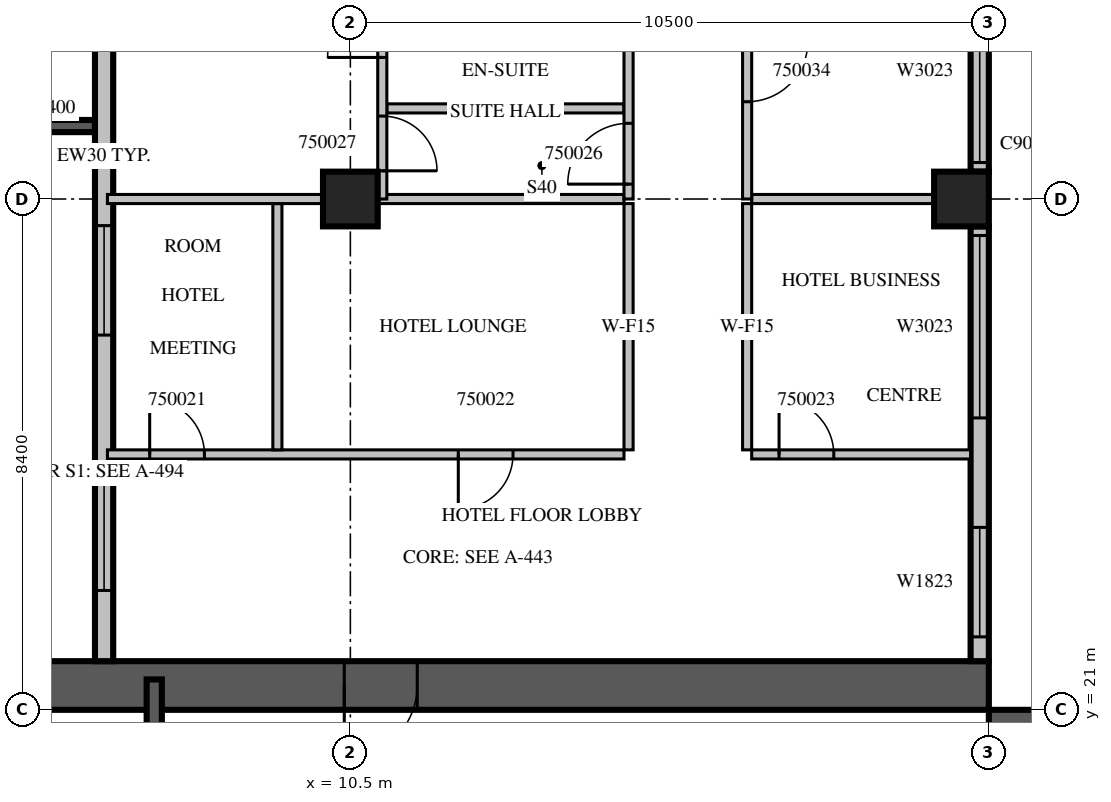
"""IFC4 building model, lengths in metres.
Left out: names, types, materials, properties, quantities, classifications, styles, units other than length and angle.
Written with IfcOpenShell. Run it as: python <this file> out.ifc"""

import sys

from ifc_helpers import new_model, si_unit, direction, frame, frame_2d, origin, origin_2d, place, context, subcontext, project, spatial, rectangle, extrude, source, transform, mapped, element, fill, save


model = new_model("IFC4")
c1 = context("Model", 3, precision=1e-05, world=origin(), true_north=direction((0.0, 1.0)))
c2 = subcontext(c1, "Body", "Model", "MODEL_VIEW")
j1 = project(units=[si_unit("LENGTHUNIT", "METRE"), si_unit("PLANEANGLEUNIT", "RADIAN")], contexts=[c1])
p1 = place(None, origin())
s1 = spatial("IfcSite", under=j1, at=p1, CompositionType="ELEMENT")
p2 = place(p1, origin())
s2 = spatial("IfcBuilding", under=s1, at=p2, CompositionType="ELEMENT")
p3 = place(p2, frame((0.0, 0.0, 223.4)))
s3 = spatial("IfcBuildingStorey", under=s2, at=p3, CompositionType="ELEMENT", Elevation=223.4)
m1 = source(origin(), c2, "Body", "SweptSolid", [
    extrude(rectangle(XDim=0.9, YDim=0.9, at=origin_2d()), origin(), (0.0, 0.0, 1.0), 3.8),
])
for number, where, z_axis, x_axis in (
    (1, (10.5, 29.4, 0.0), (0.0, 0.0, 1.0), (1.0, 0.0, 0.0)),
    (2, (20.55, 29.4, 0.0), (0.0, 0.0, 1.0), (1.0, 0.0, 0.0)),
):
    element("IfcColumn", number, at=place(p3, frame(where, z_axis=z_axis, x_axis=x_axis)), inside=s3, PredefinedType="COLUMN", context=c2, shape_type="MappedRepresentation", body=[
        mapped(m1, transform((0.0, 0.0, 0.0), scale=1.0)),
    ])
m2 = source(origin(), c2, "Body", "SweptSolid", [
    extrude(rectangle(XDim=16.8, YDim=0.8, at=frame_2d((8.4, 0.0))), origin(), (0.0, 0.0, 1.0), 3.8),
])
p4 = place(p3, frame((21.4, 4.2, 0.0), z_axis=(0.0, 0.0, 1.0), x_axis=(0.0, 1.0, 0.0)))
e3 = element("IfcWall", 3, at=p4, inside=s3, PredefinedType="SHEAR", context=c2, shape_type="MappedRepresentation", body=[
    mapped(m2, transform((0.0, 0.0, 0.0), scale=1.0)),
])
m3 = source(origin(), c2, "Body", "SweptSolid", [
    extrude(rectangle(XDim=2.2, YDim=2.1, at=frame_2d((1.1, 1.05))), frame((0.0, 0.41, 0.0), z_axis=(0.0, -1.0, 0.0), x_axis=(1.0, 0.0, 0.0)), (0.0, 0.0, 1.0), 0.82),
])
p5 = place(p4, frame((4.2, 0.0, 0.0)))
e4 = element("IfcOpeningElement", 4, at=p5, cuts=e3, PredefinedType="OPENING", context=c2, shape_type="MappedRepresentation", body=[
    mapped(m3, transform((0.0, 0.0, 0.0), scale=1.0)),
])
m4 = source(origin(), c2, "Body", "SweptSolid", [
    extrude(rectangle(XDim=1.2, YDim=2.1, at=frame_2d((0.6, 1.05))), frame((0.0, 0.41, 0.0), z_axis=(0.0, -1.0, 0.0), x_axis=(1.0, 0.0, 0.0)), (0.0, 0.0, 1.0), 0.82),
])
p6 = place(p4, frame((14.7, 0.0, 0.0)))
e5 = element("IfcOpeningElement", 5, at=p6, cuts=e3, PredefinedType="OPENING", context=c2, shape_type="MappedRepresentation", body=[
    mapped(m4, transform((0.0, 0.0, 0.0), scale=1.0)),
])
p7 = place(p3, frame((4.2, 21.4, 0.0), z_axis=(0.0, 0.0, 1.0), x_axis=(1.0, 0.0, 0.0)))
e6 = element("IfcWall", 6, at=p7, inside=s3, PredefinedType="SHEAR", context=c2, shape_type="MappedRepresentation", body=[
    mapped(m2, transform((0.0, 0.0, 0.0), scale=1.0)),
])
p8 = place(p7, frame((6.2, 0.0, 0.0)))
e7 = element("IfcOpeningElement", 7, at=p8, cuts=e6, PredefinedType="OPENING", context=c2, shape_type="MappedRepresentation", body=[
    mapped(m4, transform((0.0, 0.0, 0.0), scale=1.0)),
])
m5 = source(origin(), c2, "Body", "SweptSolid", [
    extrude(rectangle(XDim=2.1, YDim=0.2, at=frame_2d((1.05, 0.0))), origin(), (0.0, 0.0, 1.0), 3.4),
])
p9 = place(p3, frame((6.3, 30.6, 0.0), z_axis=(0.0, 0.0, 1.0), x_axis=(-1.0, 0.0, 0.0)))
e8 = element("IfcWall", 8, at=p9, inside=s3, PredefinedType="SOLIDWALL", context=c2, shape_type="MappedRepresentation", body=[
    mapped(m5, transform((0.0, 0.0, 0.0), scale=1.0)),
])
m6 = source(origin(), c2, "Body", "SweptSolid", [
    extrude(rectangle(XDim=7.15, YDim=0.3, at=frame_2d((3.575, 0.0))), origin(), (0.0, 0.0, 1.0), 3.4),
])
p10 = place(p3, frame((20.85, 21.8, 0.0), z_axis=(0.0, 0.0, 1.0), x_axis=(0.0, 1.0, 0.0)))
e9 = element("IfcWall", 9, at=p10, inside=s3, PredefinedType="STANDARD", context=c2, shape_type="MappedRepresentation", body=[
    mapped(m6, transform((0.0, 0.0, 0.0), scale=1.0)),
])
m7 = source(origin(), c2, "Body", "SweptSolid", [
    extrude(rectangle(XDim=1.8, YDim=2.3, at=frame_2d((0.9, 1.15))), frame((0.0, 0.16, 0.0), z_axis=(0.0, -1.0, 0.0), x_axis=(1.0, 0.0, 0.0)), (0.0, 0.0, 1.0), 0.32),
])
p11 = place(p10, frame((0.4, 0.0, 0.6)))
e10 = element("IfcOpeningElement", 10, at=p11, cuts=e9, PredefinedType="OPENING", context=c2, shape_type="MappedRepresentation", body=[
    mapped(m7, transform((0.0, 0.0, 0.0), scale=1.0)),
])
m8 = source(origin(), c2, "Body", "SweptSolid", [
    extrude(rectangle(XDim=3.0, YDim=2.3, at=frame_2d((1.5, 1.15))), frame((0.0, 0.16, 0.0), z_axis=(0.0, -1.0, 0.0), x_axis=(1.0, 0.0, 0.0)), (0.0, 0.0, 1.0), 0.32),
])
p12 = place(p10, frame((4.0, 0.0, 0.6)))
e11 = element("IfcOpeningElement", 11, at=p12, cuts=e9, PredefinedType="OPENING", context=c2, shape_type="MappedRepresentation", body=[
    mapped(m8, transform((0.0, 0.0, 0.0), scale=1.0)),
])
m9 = source(origin(), c2, "Body", "SweptSolid", [
    extrude(rectangle(XDim=7.5, YDim=0.3, at=frame_2d((3.75, 0.0))), origin(), (0.0, 0.0, 1.0), 3.4),
])
p13 = place(p3, frame((20.85, 29.85, 0.0), z_axis=(0.0, 0.0, 1.0), x_axis=(0.0, 1.0, 0.0)))
e12 = element("IfcWall", 12, at=p13, inside=s3, PredefinedType="STANDARD", context=c2, shape_type="MappedRepresentation", body=[
    mapped(m9, transform((0.0, 0.0, 0.0), scale=1.0)),
])
p14 = place(p13, frame((0.15, 0.0, 0.6)))
e13 = element("IfcOpeningElement", 13, at=p14, cuts=e12, PredefinedType="OPENING", context=c2, shape_type="MappedRepresentation", body=[
    mapped(m8, transform((0.0, 0.0, 0.0), scale=1.0)),
])
m10 = source(origin(), c2, "Body", "SweptSolid", [
    extrude(rectangle(XDim=1.0, YDim=2.1, at=frame_2d((0.5, 1.05))), frame((0.0, 0.16, 0.0), z_axis=(0.0, -1.0, 0.0), x_axis=(1.0, 0.0, 0.0)), (0.0, 0.0, 1.0), 0.32),
])
p15 = place(p13, frame((5.35, 0.0, 0.0)))
e14 = element("IfcOpeningElement", 14, at=p15, cuts=e12, PredefinedType="OPENING", context=c2, shape_type="MappedRepresentation", body=[
    mapped(m10, transform((0.0, 0.0, 0.0), scale=1.0)),
])
m11 = source(origin(), c2, "Body", "SweptSolid", [
    extrude(rectangle(XDim=16.6, YDim=0.3, at=frame_2d((8.3, 0.0))), origin(), (0.0, 0.0, 1.0), 3.4),
])
p16 = place(p3, frame((6.45, 38.4, 0.0), z_axis=(0.0, 0.0, 1.0), x_axis=(0.0, -1.0, 0.0)))
e15 = element("IfcWall", 15, at=p16, inside=s3, PredefinedType="STANDARD", context=c2, shape_type="MappedRepresentation", body=[
    mapped(m11, transform((0.0, 0.0, 0.0), scale=1.0)),
])
p17 = place(p16, frame((1.15, 0.0, 0.6)))
e16 = element("IfcOpeningElement", 16, at=p17, cuts=e15, PredefinedType="OPENING", context=c2, shape_type="MappedRepresentation", body=[
    mapped(m7, transform((0.0, 0.0, 0.0), scale=1.0)),
])
p18 = place(p16, frame((9.438, 0.0, 0.6)))
e17 = element("IfcOpeningElement", 17, at=p18, cuts=e15, PredefinedType="OPENING", context=c2, shape_type="MappedRepresentation", body=[
    mapped(m7, transform((0.0, 0.0, 0.0), scale=1.0)),
])
p19 = place(p16, frame((13.637, 0.0, 0.6)))
e18 = element("IfcOpeningElement", 18, at=p19, cuts=e15, PredefinedType="OPENING", context=c2, shape_type="MappedRepresentation", body=[
    mapped(m7, transform((0.0, 0.0, 0.0), scale=1.0)),
])
p20 = place(p16, frame((5.45, 0.0, 0.0)))
e19 = element("IfcOpeningElement", 19, at=p20, cuts=e15, PredefinedType="OPENING", context=c2, shape_type="MappedRepresentation", body=[
    mapped(m10, transform((0.0, 0.0, 0.0), scale=1.0)),
])
m12 = source(origin(), c2, "Body", "SweptSolid", [
    extrude(rectangle(XDim=6.6, YDim=0.25, at=frame_2d((3.3, 0.0))), origin(), (0.0, 0.0, 1.0), 3.4),
])
p21 = place(p3, frame((7.275, 14.9, 0.0), z_axis=(0.0, 0.0, 1.0), x_axis=(0.0, 1.0, 0.0)))
e20 = element("IfcWall", 20, at=p21, inside=s3, PredefinedType="SOLIDWALL", context=c2, shape_type="MappedRepresentation", body=[
    mapped(m12, transform((0.0, 0.0, 0.0), scale=1.0)),
])
m13 = source(origin(), c2, "Body", "SweptSolid", [
    extrude(rectangle(XDim=1.1, YDim=2.1, at=frame_2d((0.55, 1.05))), frame((0.0, 0.135, 0.0), z_axis=(0.0, -1.0, 0.0), x_axis=(1.0, 0.0, 0.0)), (0.0, 0.0, 1.0), 0.27),
])
p22 = place(p21, frame((0.15, 0.0, 0.0)))
e21 = element("IfcOpeningElement", 21, at=p22, cuts=e20, PredefinedType="OPENING", context=c2, shape_type="MappedRepresentation", body=[
    mapped(m13, transform((0.0, 0.0, 0.0), scale=1.0)),
])
m14 = source(origin(), c2, "Body", "SweptSolid", [
    extrude(rectangle(XDim=8.495, YDim=0.15, at=frame_2d((4.247, 0.0))), origin(), (0.0, 0.0, 1.0), 3.4),
])
p23 = place(p3, frame((6.505, 25.2, 0.0), z_axis=(0.0, 0.0, 1.0), x_axis=(1.0, 0.0, 0.0)))
e22 = element("IfcWall", 22, at=p23, inside=s3, PredefinedType="PARTITIONING", context=c2, shape_type="MappedRepresentation", body=[
    mapped(m14, transform((0.0, 0.0, 0.0), scale=1.0)),
])
m15 = source(origin(), c2, "Body", "SweptSolid", [
    extrude(rectangle(XDim=0.9, YDim=2.1, at=frame_2d((0.45, 1.05))), frame((0.0, 0.085, 0.0), z_axis=(0.0, -1.0, 0.0), x_axis=(1.0, 0.0, 0.0)), (0.0, 0.0, 1.0), 0.17),
])
p24 = place(p23, frame((0.695, 0.0, 0.0)))
e23 = element("IfcOpeningElement", 23, at=p24, cuts=e22, PredefinedType="OPENING", context=c2, shape_type="MappedRepresentation", body=[
    mapped(m15, transform((0.0, 0.0, 0.0), scale=1.0)),
])
p25 = place(p23, frame((5.77, 0.0, 0.0)))
e24 = element("IfcOpeningElement", 24, at=p25, cuts=e22, PredefinedType="OPENING", context=c2, shape_type="MappedRepresentation", body=[
    mapped(m15, transform((0.0, 0.0, 0.0), scale=1.0)),
])
m16 = source(origin(), c2, "Body", "SweptSolid", [
    extrude(rectangle(XDim=3.6, YDim=0.15, at=frame_2d((1.8, 0.0))), origin(), (0.0, 0.0, 1.0), 3.4),
])
p26 = place(p3, frame((17.1, 25.2, 0.0), z_axis=(0.0, 0.0, 1.0), x_axis=(1.0, 0.0, 0.0)))
e25 = element("IfcWall", 25, at=p26, inside=s3, PredefinedType="PARTITIONING", context=c2, shape_type="MappedRepresentation", body=[
    mapped(m16, transform((0.0, 0.0, 0.0), scale=1.0)),
])
p27 = place(p26, frame((0.45, 0.0, 0.0)))
e26 = element("IfcOpeningElement", 26, at=p27, cuts=e25, PredefinedType="OPENING", context=c2, shape_type="MappedRepresentation", body=[
    mapped(m15, transform((0.0, 0.0, 0.0), scale=1.0)),
])
m17 = source(origin(), c2, "Body", "SweptSolid", [
    extrude(rectangle(XDim=4.05, YDim=0.15, at=frame_2d((2.025, 0.0))), origin(), (0.0, 0.0, 1.0), 3.4),
])
for number, where, z_axis, x_axis in (
    (27, (9.3, 25.275, 0.0), (0.0, 0.0, 1.0), (0.0, 1.0, 0.0)),
    (28, (15.075, 25.275, 0.0), (0.0, 0.0, 1.0), (0.0, 1.0, 0.0)),
    (29, (17.025, 29.325, 0.0), (0.0, 0.0, 1.0), (0.0, -1.0, 0.0)),
):
    element("IfcWall", number, at=place(p3, frame(where, z_axis=z_axis, x_axis=x_axis)), inside=s3, PredefinedType="PARTITIONING", context=c2, shape_type="MappedRepresentation", body=[
        mapped(m17, transform((0.0, 0.0, 0.0), scale=1.0)),
    ])
m18 = source(origin(), c2, "Body", "SweptSolid", [
    extrude(rectangle(XDim=3.546, YDim=0.15, at=frame_2d((1.773, 0.0))), origin(), (0.0, 0.0, 1.0), 3.4),
])
p28 = place(p3, frame((10.051, 29.4, 0.0), z_axis=(0.0, 0.0, 1.0), x_axis=(-1.0, 0.0, 0.0)))
e30 = element("IfcWall", 30, at=p28, inside=s3, PredefinedType="PARTITIONING", context=c2, shape_type="MappedRepresentation", body=[
    mapped(m18, transform((0.0, 0.0, 0.0), scale=1.0)),
])
m19 = source(origin(), c2, "Body", "SweptSolid", [
    extrude(rectangle(XDim=4.051, YDim=0.15, at=frame_2d((2.026, 0.0))), origin(), (0.0, 0.0, 1.0), 3.4),
])
p29 = place(p3, frame((15.0, 29.4, 0.0), z_axis=(0.0, 0.0, 1.0), x_axis=(-1.0, 0.0, 0.0)))
e31 = element("IfcWall", 31, at=p29, inside=s3, PredefinedType="PARTITIONING", context=c2, shape_type="MappedRepresentation", body=[
    mapped(m19, transform((0.0, 0.0, 0.0), scale=1.0)),
])
m20 = source(origin(), c2, "Body", "SweptSolid", [
    extrude(rectangle(XDim=3.001, YDim=0.15, at=frame_2d((1.5, 0.0))), origin(), (0.0, 0.0, 1.0), 3.4),
])
p30 = place(p3, frame((20.101, 29.4, 0.0), z_axis=(0.0, 0.0, 1.0), x_axis=(-1.0, 0.0, 0.0)))
e32 = element("IfcWall", 32, at=p30, inside=s3, PredefinedType="PARTITIONING", context=c2, shape_type="MappedRepresentation", body=[
    mapped(m20, transform((0.0, 0.0, 0.0), scale=1.0)),
])
m21 = source(origin(), c2, "Body", "SweptSolid", [
    extrude(rectangle(XDim=3.9, YDim=0.15, at=frame_2d((1.95, 0.0))), origin(), (0.0, 0.0, 1.0), 3.4),
])
p31 = place(p3, frame((15.0, 30.89, 0.0), z_axis=(0.0, 0.0, 1.0), x_axis=(-1.0, 0.0, 0.0)))
e33 = element("IfcWall", 33, at=p31, inside=s3, PredefinedType="PARTITIONING", context=c2, shape_type="MappedRepresentation", body=[
    mapped(m21, transform((0.0, 0.0, 0.0), scale=1.0)),
])
m22 = source(origin(), c2, "Body", "SweptSolid", [
    extrude(rectangle(XDim=8.4, YDim=0.15, at=frame_2d((4.2, 0.0))), origin(), (0.0, 0.0, 1.0), 3.4),
])
p32 = place(p3, frame((11.025, 29.4, 0.0), z_axis=(0.0, 0.0, 1.0), x_axis=(0.0, 1.0, 0.0)))
e34 = element("IfcWall", 34, at=p32, inside=s3, PredefinedType="PARTITIONING", context=c2, shape_type="MappedRepresentation", body=[
    mapped(m22, transform((0.0, 0.0, 0.0), scale=1.0)),
])
p33 = place(p32, frame((0.464, 0.0, 0.0)))
e35 = element("IfcOpeningElement", 35, at=p33, cuts=e34, PredefinedType="OPENING", context=c2, shape_type="MappedRepresentation", body=[
    mapped(m15, transform((0.0, 0.0, 0.0), scale=1.0)),
])
p34 = place(p32, frame((2.328, 0.0, 0.0)))
e36 = element("IfcOpeningElement", 36, at=p34, cuts=e34, PredefinedType="OPENING", context=c2, shape_type="MappedRepresentation", body=[
    mapped(m15, transform((0.0, 0.0, 0.0), scale=1.0)),
])
p35 = place(p3, frame((15.075, 29.4, 0.0), z_axis=(0.0, 0.0, 1.0), x_axis=(0.0, 1.0, 0.0)))
e37 = element("IfcWall", 37, at=p35, inside=s3, PredefinedType="PARTITIONING", context=c2, shape_type="MappedRepresentation", body=[
    mapped(m22, transform((0.0, 0.0, 0.0), scale=1.0)),
])
m23 = source(origin(), c2, "Body", "SweptSolid", [
    extrude(rectangle(XDim=1.0, YDim=2.1, at=frame_2d((0.5, 1.05))), frame((0.0, 0.085, 0.0), z_axis=(0.0, -1.0, 0.0), x_axis=(1.0, 0.0, 0.0)), (0.0, 0.0, 1.0), 0.17),
])
p36 = place(p35, frame((0.245, 0.0, 0.0)))
e38 = element("IfcOpeningElement", 38, at=p36, cuts=e37, PredefinedType="OPENING", context=c2, shape_type="MappedRepresentation", body=[
    mapped(m23, transform((0.0, 0.0, 0.0), scale=1.0)),
])
p37 = place(p35, frame((5.733, 0.0, 0.0)))
e39 = element("IfcOpeningElement", 39, at=p37, cuts=e37, PredefinedType="OPENING", context=c2, shape_type="MappedRepresentation", body=[
    mapped(m15, transform((0.0, 0.0, 0.0), scale=1.0)),
])
m24 = source(origin(), c2, "Body", "SweptSolid", [
    extrude(rectangle(XDim=19.86, YDim=0.15, at=frame_2d((9.93, 0.0))), origin(), (0.0, 0.0, 1.0), 3.4),
])
p38 = place(p3, frame((17.025, 49.26, 0.0), z_axis=(0.0, 0.0, 1.0), x_axis=(0.0, -1.0, 0.0)))
e40 = element("IfcWall", 40, at=p38, inside=s3, PredefinedType="PARTITIONING", context=c2, shape_type="MappedRepresentation", body=[
    mapped(m24, transform((0.0, 0.0, 0.0), scale=1.0)),
])
p39 = place(p38, frame((17.26, 0.0, 0.0)))
e41 = element("IfcOpeningElement", 41, at=p39, cuts=e40, PredefinedType="OPENING", context=c2, shape_type="MappedRepresentation", body=[
    mapped(m23, transform((0.0, 0.0, 0.0), scale=1.0)),
])
p40 = place(p38, frame((10.96, 0.0, 0.0)))
e42 = element("IfcOpeningElement", 42, at=p40, cuts=e40, PredefinedType="OPENING", context=c2, shape_type="MappedRepresentation", body=[
    mapped(m23, transform((0.0, 0.0, 0.0), scale=1.0)),
])
p41 = place(p38, frame((5.138, 0.0, 0.0)))
e43 = element("IfcOpeningElement", 43, at=p41, cuts=e40, PredefinedType="OPENING", context=c2, shape_type="MappedRepresentation", body=[
    mapped(m23, transform((0.0, 0.0, 0.0), scale=1.0)),
])
p42 = place(p38, frame((2.249, 0.0, 0.0)))
e44 = element("IfcOpeningElement", 44, at=p42, cuts=e40, PredefinedType="OPENING", context=c2, shape_type="MappedRepresentation", body=[
    mapped(m23, transform((0.0, 0.0, 0.0), scale=1.0)),
])
p43 = place(p38, frame((0.203, 0.0, 0.0)))
e45 = element("IfcOpeningElement", 45, at=p43, cuts=e40, PredefinedType="OPENING", context=c2, shape_type="MappedRepresentation", body=[
    mapped(m23, transform((0.0, 0.0, 0.0), scale=1.0)),
])
m25 = source(origin(), c2, "Body", "SweptSolid", [
    extrude(rectangle(XDim=1.8, YDim=2.3, at=frame_2d((0.9, 1.15))), frame((0.0, 0.03, 0.0), z_axis=(0.0, -1.0, 0.0), x_axis=(1.0, 0.0, 0.0)), (0.0, 0.0, 1.0), 0.06),
])
p44 = place(p11, origin())
e46 = element("IfcWindow", 46, at=p44, inside=s3, PartitioningType="SINGLE_PANEL", PredefinedType="WINDOW", context=c2, shape_type="MappedRepresentation", body=[
    mapped(m25, transform((0.0, 0.0, 0.0), scale=1.0)),
])
fill(e10, e46)
m26 = source(origin(), c2, "Body", "SweptSolid", [
    extrude(rectangle(XDim=3.0, YDim=2.3, at=frame_2d((1.5, 1.15))), frame((0.0, 0.03, 0.0), z_axis=(0.0, -1.0, 0.0), x_axis=(1.0, 0.0, 0.0)), (0.0, 0.0, 1.0), 0.06),
])
p45 = place(p12, origin())
e47 = element("IfcWindow", 47, at=p45, inside=s3, PartitioningType="SINGLE_PANEL", PredefinedType="WINDOW", context=c2, shape_type="MappedRepresentation", body=[
    mapped(m26, transform((0.0, 0.0, 0.0), scale=1.0)),
])
fill(e11, e47)
p46 = place(p14, origin())
e48 = element("IfcWindow", 48, at=p46, inside=s3, PartitioningType="SINGLE_PANEL", PredefinedType="WINDOW", context=c2, shape_type="MappedRepresentation", body=[
    mapped(m26, transform((0.0, 0.0, 0.0), scale=1.0)),
])
fill(e13, e48)
p47 = place(p18, origin())
e49 = element("IfcWindow", 49, at=p47, inside=s3, PartitioningType="SINGLE_PANEL", PredefinedType="WINDOW", context=c2, shape_type="MappedRepresentation", body=[
    mapped(m25, transform((0.0, 0.0, 0.0), scale=1.0)),
])
fill(e17, e49)
p48 = place(p19, origin())
e50 = element("IfcWindow", 50, at=p48, inside=s3, PartitioningType="SINGLE_PANEL", PredefinedType="WINDOW", context=c2, shape_type="MappedRepresentation", body=[
    mapped(m25, transform((0.0, 0.0, 0.0), scale=1.0)),
])
fill(e18, e50)
m27 = source(origin(), c2, "Body", "SweptSolid", [
    extrude(rectangle(XDim=1.2, YDim=2.1, at=frame_2d((0.6, 1.05))), frame((0.0, 0.025, 0.0), z_axis=(0.0, -1.0, 0.0), x_axis=(1.0, 0.0, 0.0)), (0.0, 0.0, 1.0), 0.05),
])
p49 = place(p8, origin())
e51 = element("IfcDoor", 51, at=p49, inside=s3, OperationType="SINGLE_SWING_RIGHT", PredefinedType="DOOR", context=c2, shape_type="MappedRepresentation", body=[
    mapped(m27, transform((0.0, 0.0, 0.0), scale=1.0)),
])
fill(e7, e51)
m28 = source(origin(), c2, "Body", "SweptSolid", [
    extrude(rectangle(XDim=0.9, YDim=2.1, at=frame_2d((0.45, 1.05))), frame((0.0, 0.025, 0.0), z_axis=(0.0, -1.0, 0.0), x_axis=(1.0, 0.0, 0.0)), (0.0, 0.0, 1.0), 0.05),
])
p50 = place(p24, origin())
e52 = element("IfcDoor", 52, at=p50, inside=s3, OperationType="SINGLE_SWING_LEFT", PredefinedType="DOOR", context=c2, shape_type="MappedRepresentation", body=[
    mapped(m28, transform((0.0, 0.0, 0.0), scale=1.0)),
])
fill(e23, e52)
p51 = place(p25, origin())
e53 = element("IfcDoor", 53, at=p51, inside=s3, OperationType="SINGLE_SWING_RIGHT", PredefinedType="DOOR", context=c2, shape_type="MappedRepresentation", body=[
    mapped(m28, transform((0.0, 0.0, 0.0), scale=1.0)),
])
fill(e24, e53)
p52 = place(p27, origin())
e54 = element("IfcDoor", 54, at=p52, inside=s3, OperationType="SINGLE_SWING_LEFT", PredefinedType="DOOR", context=c2, shape_type="MappedRepresentation", body=[
    mapped(m28, transform((0.0, 0.0, 0.0), scale=1.0)),
])
fill(e26, e54)
m29 = source(origin(), c2, "Body", "SweptSolid", [
    extrude(rectangle(XDim=1.0, YDim=2.1, at=frame_2d((0.5, 1.05))), frame((0.0, 0.025, 0.0), z_axis=(0.0, -1.0, 0.0), x_axis=(1.0, 0.0, 0.0)), (0.0, 0.0, 1.0), 0.05),
])
p53 = place(p36, origin())
e55 = element("IfcDoor", 55, at=p53, inside=s3, OperationType="SINGLE_SWING_LEFT", PredefinedType="DOOR", context=c2, shape_type="MappedRepresentation", body=[
    mapped(m29, transform((0.0, 0.0, 0.0), scale=1.0)),
])
fill(e38, e55)
p54 = place(p33, origin())
e56 = element("IfcDoor", 56, at=p54, inside=s3, OperationType="SINGLE_SWING_RIGHT", PredefinedType="DOOR", context=c2, shape_type="MappedRepresentation", body=[
    mapped(m28, transform((0.0, 0.0, 0.0), scale=1.0)),
])
fill(e35, e56)
p55 = place(p34, origin())
e57 = element("IfcDoor", 57, at=p55, inside=s3, OperationType="SINGLE_SWING_LEFT", PredefinedType="DOOR", context=c2, shape_type="MappedRepresentation", body=[
    mapped(m28, transform((0.0, 0.0, 0.0), scale=1.0)),
])
fill(e36, e57)
p56 = place(p39, origin())
e58 = element("IfcDoor", 58, at=p56, inside=s3, OperationType="SINGLE_SWING_LEFT", PredefinedType="DOOR", context=c2, shape_type="MappedRepresentation", body=[
    mapped(m29, transform((0.0, 0.0, 0.0), scale=1.0)),
])
fill(e41, e58)
save(model, sys.argv[1])
